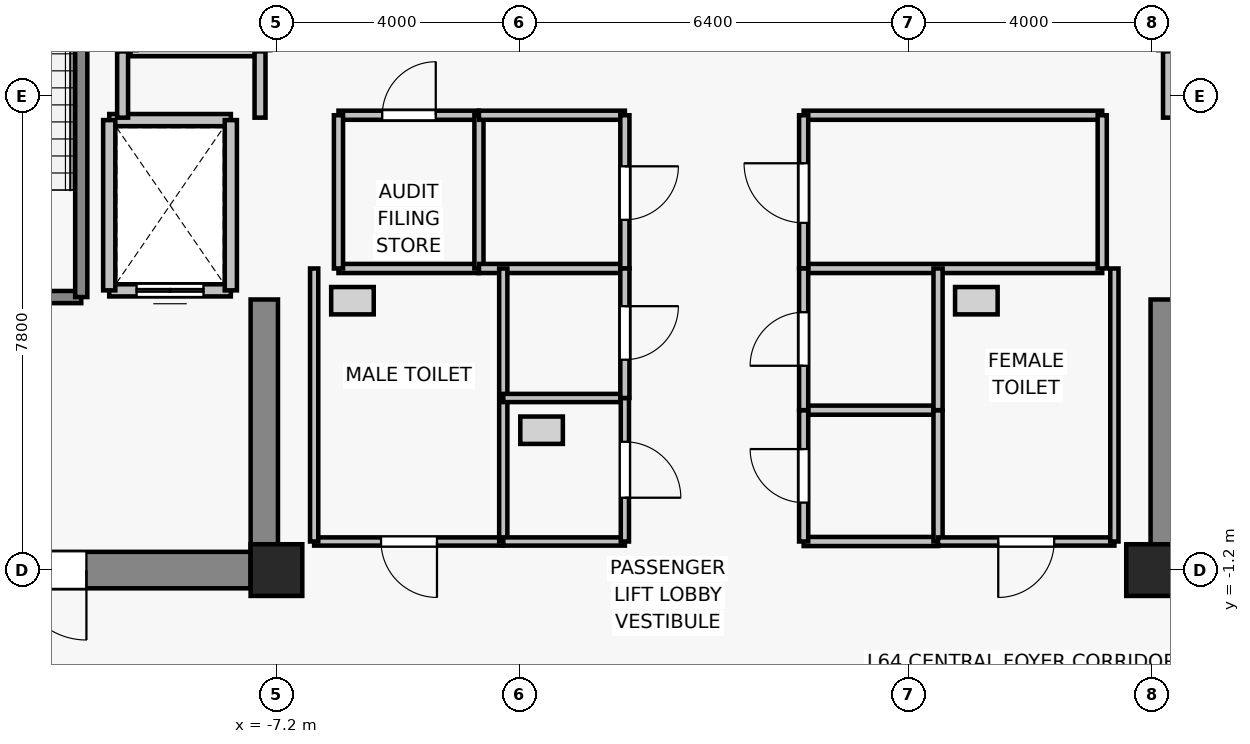
"""IFC4 building model, lengths in metres.
Left out: names, types, materials, properties, quantities, classifications, styles, units other than length and angle.
Written with IfcOpenShell. Run it as: python <this file> out.ifc"""

import sys

from ifc_helpers import new_model, si_unit, direction, frame, frame_2d, origin, origin_2d, place, context, subcontext, project, spatial, rectangle, extrude, source, transform, mapped, element, fill, save


model = new_model("IFC4")
c1 = context("Model", 3, precision=1e-05, world=origin(), true_north=direction((0.0, 1.0)))
c2 = subcontext(c1, "Body", "Model", "MODEL_VIEW")
j1 = project(units=[si_unit("LENGTHUNIT", "METRE"), si_unit("PLANEANGLEUNIT", "RADIAN")], contexts=[c1])
p1 = place(None, origin())
s1 = spatial("IfcSite", under=j1, at=p1, CompositionType="ELEMENT")
p2 = place(p1, origin())
s2 = spatial("IfcBuilding", under=s1, at=p2, CompositionType="ELEMENT")
p3 = place(p2, frame((0.0, 0.0, 228.7)))
s3 = spatial("IfcBuildingStorey", under=s2, at=p3, CompositionType="ELEMENT", Elevation=228.7)
for number, where, z_axis, x_axis in (
    (1, (-7.2, -1.2, 0.0), (0.0, 0.0, 1.0), (1.0, 0.0, 0.0)),
    (2, (7.2, -1.2, 0.0), (0.0, 0.0, 1.0), (1.0, 0.0, 0.0)),
):
    element("IfcColumn", number, at=place(p3, frame(where, z_axis=z_axis, x_axis=x_axis)), inside=s3, PredefinedType="COLUMN", context=c2, shape_type="SweptSolid", body=[
        extrude(rectangle(XDim=0.85, YDim=0.85, at=origin_2d()), origin(), (0.0, 0.0, 1.0), 3.3),
    ])
p4 = place(p3, frame((-7.625, -1.2, 0.0), z_axis=(0.0, 0.0, 1.0), x_axis=(-1.0, 0.0, 0.0)))
e3 = element("IfcWall", 3, at=p4, inside=s3, PredefinedType="SHEAR", context=c2, shape_type="SweptSolid", body=[
    extrude(rectangle(XDim=6.35, YDim=0.6, at=frame_2d((3.175, 0.0))), origin(), (0.0, 0.0, 1.0), 3.075),
])
p5 = place(p4, frame((2.7, 0.0, 0.0)))
e4 = element("IfcOpeningElement", 4, at=p5, cuts=e3, PredefinedType="OPENING", context=c2, shape_type="SweptSolid", body=[
    extrude(rectangle(XDim=1.15, YDim=2.15, at=frame_2d((0.575, 1.075))), frame((0.0, 0.31, 0.0), z_axis=(0.0, -1.0, 0.0), x_axis=(1.0, 0.0, 0.0)), (0.0, 0.0, 1.0), 0.62),
])
for number, where, z_axis, x_axis in (
    (5, (-7.4, -0.9, 0.0), (0.0, 0.0, 1.0), (0.0, 1.0, 0.0)),
    (6, (7.4, -0.9, 0.0), (0.0, 0.0, 1.0), (0.0, 1.0, 0.0)),
):
    element("IfcWall", number, at=place(p3, frame(where, z_axis=z_axis, x_axis=x_axis)), inside=s3, PredefinedType="SHEAR", context=c2, shape_type="SweptSolid", body=[
        extrude(rectangle(XDim=4.15, YDim=0.45, at=frame_2d((2.075, 0.0))), origin(), (0.0, 0.0, 1.0), 3.075),
    ])
p6 = place(p3, frame((-7.95, 3.4, 0.0), z_axis=(0.0, 0.0, 1.0), x_axis=(-1.0, 0.0, 0.0)))
e7 = element("IfcWall", 7, at=p6, inside=s3, PredefinedType="SOLIDWALL", context=c2, shape_type="SweptSolid", body=[
    extrude(rectangle(XDim=2.0, YDim=0.2, at=frame_2d((1.0, 0.0))), origin(), (0.0, 0.0, 1.0), 3.075),
])
p7 = place(p6, frame((0.45, 0.0, 0.0)))
e8 = element("IfcOpeningElement", 8, at=p7, cuts=e7, PredefinedType="OPENING", context=c2, shape_type="SweptSolid", body=[
    extrude(rectangle(XDim=1.1, YDim=2.2, at=frame_2d((0.55, 1.1))), frame((0.0, 0.11, 0.0), z_axis=(0.0, -1.0, 0.0), x_axis=(1.0, 0.0, 0.0)), (0.0, 0.0, 1.0), 0.22),
])
p8 = place(p3, frame((-9.95, 6.2, 0.0), z_axis=(0.0, 0.0, 1.0), x_axis=(1.0, 0.0, 0.0)))
e9 = element("IfcWall", 9, at=p8, inside=s3, PredefinedType="SOLIDWALL", context=c2, shape_type="SweptSolid", body=[
    extrude(rectangle(XDim=2.0, YDim=0.2, at=frame_2d((1.0, 0.0))), origin(), (0.0, 0.0, 1.0), 3.075),
])
for number, where, z_axis, x_axis in (
    (10, (-9.95, 3.4, 0.0), (0.0, 0.0, 1.0), (0.0, 1.0, 0.0)),
    (11, (-7.95, 6.2, 0.0), (0.0, 0.0, 1.0), (0.0, -1.0, 0.0)),
):
    element("IfcWall", number, at=place(p3, frame(where, z_axis=z_axis, x_axis=x_axis)), inside=s3, PredefinedType="SOLIDWALL", context=c2, shape_type="SweptSolid", body=[
        extrude(rectangle(XDim=2.8, YDim=0.2, at=frame_2d((1.4, 0.0))), origin(), (0.0, 0.0, 1.0), 3.075),
    ])
for number, where, z_axis, x_axis in (
    (12, (-7.4, 7.35, 0.0), (0.0, 0.0, 1.0), (-1.0, 0.0, 0.0)),
    (13, (9.6, 7.35, 0.0), (0.0, 0.0, 1.0), (-1.0, 0.0, 0.0)),
):
    element("IfcWall", number, at=place(p3, frame(where, z_axis=z_axis, x_axis=x_axis)), inside=s3, PredefinedType="SOLIDWALL", context=c2, shape_type="SweptSolid", body=[
        extrude(rectangle(XDim=2.2, YDim=0.2, at=frame_2d((1.1, 0.0))), origin(), (0.0, 0.0, 1.0), 2.615),
    ])
p9 = place(p3, frame((-10.41, 3.29, 0.0), z_axis=(0.0, 0.0, 1.0), x_axis=(-1.0, 0.0, 0.0)))
e14 = element("IfcWall", 14, at=p9, inside=s3, PredefinedType="SOLIDWALL", context=c2, shape_type="SweptSolid", body=[
    extrude(rectangle(XDim=3.52, YDim=0.2, at=frame_2d((1.76, 0.0))), origin(), (0.0, 0.0, 1.0), 3.075),
])
p10 = place(p9, frame((1.165, 0.0, 0.0)))
e15 = element("IfcOpeningElement", 15, at=p10, cuts=e14, PredefinedType="OPENING", context=c2, shape_type="SweptSolid", body=[
    extrude(rectangle(XDim=1.15, YDim=2.15, at=frame_2d((0.575, 1.075))), frame((0.0, 0.11, 0.0), z_axis=(0.0, -1.0, 0.0), x_axis=(1.0, 0.0, 0.0)), (0.0, 0.0, 1.0), 0.22),
])
p11 = place(p3, frame((-10.41, 12.13, 0.0), z_axis=(0.0, 0.0, 1.0), x_axis=(0.0, -1.0, 0.0)))
e16 = element("IfcWall", 16, at=p11, inside=s3, PredefinedType="SOLIDWALL", context=c2, shape_type="SweptSolid", body=[
    extrude(rectangle(XDim=8.84, YDim=0.2, at=frame_2d((4.42, 0.0))), origin(), (0.0, 0.0, 1.0), 3.075),
])
p12 = place(p3, frame((-9.73, 6.24, 0.0), z_axis=(0.0, 0.0, 1.0), x_axis=(0.0, 1.0, 0.0)))
e17 = element("IfcWall", 17, at=p12, inside=s3, PredefinedType="PARTITIONING", context=c2, shape_type="SweptSolid", body=[
    extrude(rectangle(XDim=1.09, YDim=0.18, at=frame_2d((0.545, 0.0))), origin(), (0.0, 0.0, 1.0), 3.075),
])
for number, where, z_axis, x_axis in (
    (18, (-7.47, 7.33, 0.0), (0.0, 0.0, 1.0), (0.0, -1.0, 0.0)),
    (19, (7.47, 6.24, 0.0), (0.0, 0.0, 1.0), (0.0, 1.0, 0.0)),
):
    element("IfcWall", number, at=place(p3, frame(where, z_axis=z_axis, x_axis=x_axis)), inside=s3, PredefinedType="PARTITIONING", context=c2, shape_type="SweptSolid", body=[
        extrude(rectangle(XDim=1.09, YDim=0.18, at=frame_2d((0.545, 0.0))), origin(), (0.0, 0.0, 1.0), 2.615),
    ])
p13 = place(p3, frame((-3.87, 3.76, 0.0), z_axis=(0.0, 0.0, 1.0), x_axis=(-1.0, 0.0, 0.0)))
e20 = element("IfcWall", 20, at=p13, inside=s3, PredefinedType="PARTITIONING", context=c2, shape_type="SweptSolid", body=[
    extrude(rectangle(XDim=2.31, YDim=0.15, at=frame_2d((1.155, 0.0))), origin(), (0.0, 0.0, 1.0), 3.075),
])
p14 = place(p3, frame((-6.18, 6.28, 0.0), z_axis=(0.0, 0.0, 1.0), x_axis=(1.0, 0.0, 0.0)))
e21 = element("IfcWall", 21, at=p14, inside=s3, PredefinedType="PARTITIONING", context=c2, shape_type="SweptSolid", body=[
    extrude(rectangle(XDim=2.31, YDim=0.15, at=frame_2d((1.155, 0.0))), origin(), (0.0, 0.0, 1.0), 3.075),
])
p15 = place(p14, frame((0.72, 0.0, 0.0)))
e22 = element("IfcOpeningElement", 22, at=p15, cuts=e21, PredefinedType="OPENING", context=c2, shape_type="SweptSolid", body=[
    extrude(rectangle(XDim=0.88, YDim=2.1, at=frame_2d((0.44, 1.05))), frame((0.0, 0.085, 0.0), z_axis=(0.0, -1.0, 0.0), x_axis=(1.0, 0.0, 0.0)), (0.0, 0.0, 1.0), 0.17),
])
for number, where, z_axis, x_axis in (
    (23, (-6.18, 3.76, 0.0), (0.0, 0.0, 1.0), (0.0, 1.0, 0.0)),
    (24, (-3.87, 6.28, 0.0), (0.0, 0.0, 1.0), (0.0, -1.0, 0.0)),
):
    element("IfcWall", number, at=place(p3, frame(where, z_axis=z_axis, x_axis=x_axis)), inside=s3, PredefinedType="PARTITIONING", context=c2, shape_type="SweptSolid", body=[
        extrude(rectangle(XDim=2.52, YDim=0.15, at=frame_2d((1.26, 0.0))), origin(), (0.0, 0.0, 1.0), 3.075),
    ])
for number, where, z_axis, x_axis in (
    (25, (-1.47, 3.76, 0.0), (0.0, 0.0, 1.0), (-1.0, 0.0, 0.0)),
    (26, (-3.87, 6.28, 0.0), (0.0, 0.0, 1.0), (1.0, 0.0, 0.0)),
):
    element("IfcWall", number, at=place(p3, frame(where, z_axis=z_axis, x_axis=x_axis)), inside=s3, PredefinedType="PARTITIONING", context=c2, shape_type="SweptSolid", body=[
        extrude(rectangle(XDim=2.4, YDim=0.15, at=frame_2d((1.2, 0.0))), origin(), (0.0, 0.0, 1.0), 3.075),
    ])
p16 = place(p3, frame((-1.47, 6.28, 0.0), z_axis=(0.0, 0.0, 1.0), x_axis=(0.0, -1.0, 0.0)))
e27 = element("IfcWall", 27, at=p16, inside=s3, PredefinedType="PARTITIONING", context=c2, shape_type="SweptSolid", body=[
    extrude(rectangle(XDim=2.52, YDim=0.15, at=frame_2d((1.26, 0.0))), origin(), (0.0, 0.0, 1.0), 3.075),
])
p17 = place(p16, frame((0.84, 0.0, 0.0)))
e28 = element("IfcOpeningElement", 28, at=p17, cuts=e27, PredefinedType="OPENING", context=c2, shape_type="SweptSolid", body=[
    extrude(rectangle(XDim=0.88, YDim=2.1, at=frame_2d((0.44, 1.05))), frame((0.0, 0.085, 0.0), z_axis=(0.0, -1.0, 0.0), x_axis=(1.0, 0.0, 0.0)), (0.0, 0.0, 1.0), 0.17),
])
for number, where, z_axis, x_axis in (
    (29, (6.38, 3.76, 0.0), (0.0, 0.0, 1.0), (-1.0, 0.0, 0.0)),
    (30, (1.47, 6.28, 0.0), (0.0, 0.0, 1.0), (1.0, 0.0, 0.0)),
):
    element("IfcWall", number, at=place(p3, frame(where, z_axis=z_axis, x_axis=x_axis)), inside=s3, PredefinedType="PARTITIONING", context=c2, shape_type="SweptSolid", body=[
        extrude(rectangle(XDim=4.91, YDim=0.15, at=frame_2d((2.455, 0.0))), origin(), (0.0, 0.0, 1.0), 3.075),
    ])
p18 = place(p3, frame((1.47, 3.76, 0.0), z_axis=(0.0, 0.0, 1.0), x_axis=(0.0, 1.0, 0.0)))
e31 = element("IfcWall", 31, at=p18, inside=s3, PredefinedType="PARTITIONING", context=c2, shape_type="SweptSolid", body=[
    extrude(rectangle(XDim=2.52, YDim=0.15, at=frame_2d((1.26, 0.0))), origin(), (0.0, 0.0, 1.0), 3.075),
])
p19 = place(p18, frame((0.75, 0.0, 0.0)))
e32 = element("IfcOpeningElement", 32, at=p19, cuts=e31, PredefinedType="OPENING", context=c2, shape_type="SweptSolid", body=[
    extrude(rectangle(XDim=0.98, YDim=2.15, at=frame_2d((0.49, 1.075))), frame((0.0, 0.085, 0.0), z_axis=(0.0, -1.0, 0.0), x_axis=(1.0, 0.0, 0.0)), (0.0, 0.0, 1.0), 0.17),
])
p20 = place(p3, frame((6.38, 6.28, 0.0), z_axis=(0.0, 0.0, 1.0), x_axis=(0.0, -1.0, 0.0)))
e33 = element("IfcWall", 33, at=p20, inside=s3, PredefinedType="PARTITIONING", context=c2, shape_type="SweptSolid", body=[
    extrude(rectangle(XDim=2.52, YDim=0.15, at=frame_2d((1.26, 0.0))), origin(), (0.0, 0.0, 1.0), 3.075),
])
p21 = place(p3, frame((-3.47, -0.73, 0.0), z_axis=(0.0, 0.0, 1.0), x_axis=(-1.0, 0.0, 0.0)))
e34 = element("IfcWall", 34, at=p21, inside=s3, PredefinedType="PARTITIONING", context=c2, shape_type="SweptSolid", body=[
    extrude(rectangle(XDim=3.11, YDim=0.135, at=frame_2d((1.555, 0.0))), origin(), (0.0, 0.0, 1.0), 3.075),
])
p22 = place(p21, frame((1.09, 0.0, 0.0)))
e35 = element("IfcOpeningElement", 35, at=p22, cuts=e34, PredefinedType="OPENING", context=c2, shape_type="SweptSolid", body=[
    extrude(rectangle(XDim=0.92, YDim=2.1, at=frame_2d((0.46, 1.05))), frame((0.0, 0.077, 0.0), z_axis=(0.0, -1.0, 0.0), x_axis=(1.0, 0.0, 0.0)), (0.0, 0.0, 1.0), 0.155),
])
for number, where, z_axis, x_axis in (
    (36, (-6.58, -0.73, 0.0), (0.0, 0.0, 1.0), (0.0, 1.0, 0.0)),
    (37, (-3.47, 3.76, 0.0), (0.0, 0.0, 1.0), (0.0, -1.0, 0.0)),
):
    element("IfcWall", number, at=place(p3, frame(where, z_axis=z_axis, x_axis=x_axis)), inside=s3, PredefinedType="PARTITIONING", context=c2, shape_type="SweptSolid", body=[
        extrude(rectangle(XDim=4.49, YDim=0.135, at=frame_2d((2.245, 0.0))), origin(), (0.0, 0.0, 1.0), 3.075),
    ])
for number, where, z_axis, x_axis in (
    (38, (-1.47, -0.73, 0.0), (0.0, 0.0, 1.0), (-1.0, 0.0, 0.0)),
    (39, (-3.47, 1.63, 0.0), (0.0, 0.0, 1.0), (1.0, 0.0, 0.0)),
):
    element("IfcWall", number, at=place(p3, frame(where, z_axis=z_axis, x_axis=x_axis)), inside=s3, PredefinedType="PARTITIONING", context=c2, shape_type="SweptSolid", body=[
        extrude(rectangle(XDim=2.0, YDim=0.135, at=frame_2d((1.0, 0.0))), origin(), (0.0, 0.0, 1.0), 3.075),
    ])
p23 = place(p3, frame((-1.47, 1.63, 0.0), z_axis=(0.0, 0.0, 1.0), x_axis=(0.0, -1.0, 0.0)))
e40 = element("IfcWall", 40, at=p23, inside=s3, PredefinedType="PARTITIONING", context=c2, shape_type="SweptSolid", body=[
    extrude(rectangle(XDim=2.36, YDim=0.135, at=frame_2d((1.18, 0.0))), origin(), (0.0, 0.0, 1.0), 3.075),
])
p24 = place(p23, frame((0.72, 0.0, 0.0)))
e41 = element("IfcOpeningElement", 41, at=p24, cuts=e40, PredefinedType="OPENING", context=c2, shape_type="SweptSolid", body=[
    extrude(rectangle(XDim=0.92, YDim=2.1, at=frame_2d((0.46, 1.05))), frame((0.0, 0.077, 0.0), z_axis=(0.0, -1.0, 0.0), x_axis=(1.0, 0.0, 0.0)), (0.0, 0.0, 1.0), 0.155),
])
p25 = place(p3, frame((-1.47, 3.76, 0.0), z_axis=(0.0, 0.0, 1.0), x_axis=(0.0, -1.0, 0.0)))
e42 = element("IfcWall", 42, at=p25, inside=s3, PredefinedType="PARTITIONING", context=c2, shape_type="SweptSolid", body=[
    extrude(rectangle(XDim=2.13, YDim=0.15, at=frame_2d((1.065, 0.0))), origin(), (0.0, 0.0, 1.0), 3.075),
])
p26 = place(p25, frame((0.62, 0.0, 0.0)))
e43 = element("IfcOpeningElement", 43, at=p26, cuts=e42, PredefinedType="OPENING", context=c2, shape_type="SweptSolid", body=[
    extrude(rectangle(XDim=0.88, YDim=2.1, at=frame_2d((0.44, 1.05))), frame((0.0, 0.085, 0.0), z_axis=(0.0, -1.0, 0.0), x_axis=(1.0, 0.0, 0.0)), (0.0, 0.0, 1.0), 0.17),
])
for number, where, z_axis, x_axis in (
    (44, (3.68, -0.73, 0.0), (0.0, 0.0, 1.0), (-1.0, 0.0, 0.0)),
    (45, (1.47, 1.43, 0.0), (0.0, 0.0, 1.0), (1.0, 0.0, 0.0)),
):
    element("IfcWall", number, at=place(p3, frame(where, z_axis=z_axis, x_axis=x_axis)), inside=s3, PredefinedType="PARTITIONING", context=c2, shape_type="SweptSolid", body=[
        extrude(rectangle(XDim=2.21, YDim=0.15, at=frame_2d((1.105, 0.0))), origin(), (0.0, 0.0, 1.0), 3.075),
    ])
p27 = place(p3, frame((1.47, -0.73, 0.0), z_axis=(0.0, 0.0, 1.0), x_axis=(0.0, 1.0, 0.0)))
e46 = element("IfcWall", 46, at=p27, inside=s3, PredefinedType="PARTITIONING", context=c2, shape_type="SweptSolid", body=[
    extrude(rectangle(XDim=2.16, YDim=0.15, at=frame_2d((1.08, 0.0))), origin(), (0.0, 0.0, 1.0), 3.075),
])
p28 = place(p27, frame((0.64, 0.0, 0.0)))
e47 = element("IfcOpeningElement", 47, at=p28, cuts=e46, PredefinedType="OPENING", context=c2, shape_type="SweptSolid", body=[
    extrude(rectangle(XDim=0.88, YDim=2.1, at=frame_2d((0.44, 1.05))), frame((0.0, 0.085, 0.0), z_axis=(0.0, -1.0, 0.0), x_axis=(1.0, 0.0, 0.0)), (0.0, 0.0, 1.0), 0.17),
])
p29 = place(p3, frame((3.68, 1.43, 0.0), z_axis=(0.0, 0.0, 1.0), x_axis=(0.0, -1.0, 0.0)))
e48 = element("IfcWall", 48, at=p29, inside=s3, PredefinedType="PARTITIONING", context=c2, shape_type="SweptSolid", body=[
    extrude(rectangle(XDim=2.16, YDim=0.15, at=frame_2d((1.08, 0.0))), origin(), (0.0, 0.0, 1.0), 3.075),
])
p30 = place(p3, frame((1.47, 1.43, 0.0), z_axis=(0.0, 0.0, 1.0), x_axis=(0.0, 1.0, 0.0)))
e49 = element("IfcWall", 49, at=p30, inside=s3, PredefinedType="PARTITIONING", context=c2, shape_type="SweptSolid", body=[
    extrude(rectangle(XDim=2.33, YDim=0.15, at=frame_2d((1.165, 0.0))), origin(), (0.0, 0.0, 1.0), 3.075),
])
p31 = place(p30, frame((0.73, 0.0, 0.0)))
e50 = element("IfcOpeningElement", 50, at=p31, cuts=e49, PredefinedType="OPENING", context=c2, shape_type="SweptSolid", body=[
    extrude(rectangle(XDim=0.88, YDim=2.15, at=frame_2d((0.44, 1.075))), frame((0.0, 0.085, 0.0), z_axis=(0.0, -1.0, 0.0), x_axis=(1.0, 0.0, 0.0)), (0.0, 0.0, 1.0), 0.17),
])
p32 = place(p3, frame((3.68, 3.76, 0.0), z_axis=(0.0, 0.0, 1.0), x_axis=(0.0, -1.0, 0.0)))
e51 = element("IfcWall", 51, at=p32, inside=s3, PredefinedType="PARTITIONING", context=c2, shape_type="SweptSolid", body=[
    extrude(rectangle(XDim=2.33, YDim=0.15, at=frame_2d((1.165, 0.0))), origin(), (0.0, 0.0, 1.0), 3.075),
])
p33 = place(p3, frame((6.58, -0.73, 0.0), z_axis=(0.0, 0.0, 1.0), x_axis=(-1.0, 0.0, 0.0)))
e52 = element("IfcWall", 52, at=p33, inside=s3, PredefinedType="PARTITIONING", context=c2, shape_type="SweptSolid", body=[
    extrude(rectangle(XDim=2.9, YDim=0.135, at=frame_2d((1.45, 0.0))), origin(), (0.0, 0.0, 1.0), 3.075),
])
p34 = place(p33, frame((0.99, 0.0, 0.0)))
e53 = element("IfcOpeningElement", 53, at=p34, cuts=e52, PredefinedType="OPENING", context=c2, shape_type="SweptSolid", body=[
    extrude(rectangle(XDim=0.92, YDim=2.1, at=frame_2d((0.46, 1.05))), frame((0.0, 0.077, 0.0), z_axis=(0.0, -1.0, 0.0), x_axis=(1.0, 0.0, 0.0)), (0.0, 0.0, 1.0), 0.155),
])
p35 = place(p3, frame((6.58, 3.76, 0.0), z_axis=(0.0, 0.0, 1.0), x_axis=(0.0, -1.0, 0.0)))
e54 = element("IfcWall", 54, at=p35, inside=s3, PredefinedType="PARTITIONING", context=c2, shape_type="SweptSolid", body=[
    extrude(rectangle(XDim=4.49, YDim=0.135, at=frame_2d((2.245, 0.0))), origin(), (0.0, 0.0, 1.0), 3.075),
])
m1 = source(origin(), c2, "Body", "SweptSolid", [
    extrude(rectangle(XDim=1.1, YDim=2.2, at=frame_2d((0.55, 1.1))), frame((0.0, 0.025, 0.0), z_axis=(0.0, -1.0, 0.0), x_axis=(1.0, 0.0, 0.0)), (0.0, 0.0, 1.0), 0.05),
])
p36 = place(p7, origin())
e55 = element("IfcDoor", 55, at=p36, inside=s3, OperationType="DOUBLE_DOOR_SLIDING", PredefinedType="DOOR", context=c2, shape_type="MappedRepresentation", body=[
    mapped(m1, transform((0.0, 0.0, 0.0), x_axis=(1.0, 0.0, 0.0), y_axis=(0.0, 1.0, 0.0), z_axis=(0.0, 0.0, 1.0), scale=1.0)),
])
fill(e8, e55)
m2 = source(origin(), c2, "Body", "SweptSolid", [
    extrude(rectangle(XDim=1.15, YDim=2.15, at=frame_2d((0.575, 1.075))), frame((0.0, 0.025, 0.0), z_axis=(0.0, -1.0, 0.0), x_axis=(1.0, 0.0, 0.0)), (0.0, 0.0, 1.0), 0.05),
])
p37 = place(p5, origin())
e56 = element("IfcDoor", 56, at=p37, inside=s3, OperationType="SINGLE_SWING_LEFT", PredefinedType="DOOR", context=c2, shape_type="MappedRepresentation", body=[
    mapped(m2, transform((0.0, 0.0, 0.0), x_axis=(1.0, 0.0, 0.0), y_axis=(0.0, 1.0, 0.0), z_axis=(0.0, 0.0, 1.0), scale=1.0)),
])
fill(e4, e56)
m3 = source(origin(), c2, "Body", "SweptSolid", [
    extrude(rectangle(XDim=0.88, YDim=2.1, at=frame_2d((0.44, 1.05))), frame((0.0, 0.025, 0.0), z_axis=(0.0, -1.0, 0.0), x_axis=(1.0, 0.0, 0.0)), (0.0, 0.0, 1.0), 0.05),
])
p38 = place(p15, origin())
e57 = element("IfcDoor", 57, at=p38, inside=s3, OperationType="SINGLE_SWING_RIGHT", PredefinedType="DOOR", context=c2, shape_type="MappedRepresentation", body=[
    mapped(m3, transform((0.0, 0.0, 0.0), x_axis=(1.0, 0.0, 0.0), y_axis=(0.0, 1.0, 0.0), z_axis=(0.0, 0.0, 1.0), scale=1.0)),
])
fill(e22, e57)
p39 = place(p17, origin())
e58 = element("IfcDoor", 58, at=p39, inside=s3, OperationType="SINGLE_SWING_LEFT", PredefinedType="DOOR", context=c2, shape_type="MappedRepresentation", body=[
    mapped(m3, transform((0.0, 0.0, 0.0), x_axis=(1.0, 0.0, 0.0), y_axis=(0.0, 1.0, 0.0), z_axis=(0.0, 0.0, 1.0), scale=1.0)),
])
fill(e28, e58)
m4 = source(origin(), c2, "Body", "SweptSolid", [
    extrude(rectangle(XDim=0.98, YDim=2.15, at=frame_2d((0.49, 1.075))), frame((0.0, 0.025, 0.0), z_axis=(0.0, -1.0, 0.0), x_axis=(1.0, 0.0, 0.0)), (0.0, 0.0, 1.0), 0.05),
])
p40 = place(p19, origin())
e59 = element("IfcDoor", 59, at=p40, inside=s3, OperationType="SINGLE_SWING_RIGHT", PredefinedType="DOOR", context=c2, shape_type="MappedRepresentation", body=[
    mapped(m4, transform((0.0, 0.0, 0.0), x_axis=(1.0, 0.0, 0.0), y_axis=(0.0, 1.0, 0.0), z_axis=(0.0, 0.0, 1.0), scale=1.0)),
])
fill(e32, e59)
m5 = source(origin(), c2, "Body", "SweptSolid", [
    extrude(rectangle(XDim=0.92, YDim=2.1, at=frame_2d((0.46, 1.05))), frame((0.0, 0.025, 0.0), z_axis=(0.0, -1.0, 0.0), x_axis=(1.0, 0.0, 0.0)), (0.0, 0.0, 1.0), 0.05),
])
p41 = place(p22, origin())
e60 = element("IfcDoor", 60, at=p41, inside=s3, OperationType="SINGLE_SWING_LEFT", PredefinedType="DOOR", context=c2, shape_type="MappedRepresentation", body=[
    mapped(m5, transform((0.0, 0.0, 0.0), x_axis=(1.0, 0.0, 0.0), y_axis=(0.0, 1.0, 0.0), z_axis=(0.0, 0.0, 1.0), scale=1.0)),
])
fill(e35, e60)
p42 = place(p24, origin())
e61 = element("IfcDoor", 61, at=p42, inside=s3, OperationType="SINGLE_SWING_RIGHT", PredefinedType="DOOR", context=c2, shape_type="MappedRepresentation", body=[
    mapped(m5, transform((0.0, 0.0, 0.0), x_axis=(1.0, 0.0, 0.0), y_axis=(0.0, 1.0, 0.0), z_axis=(0.0, 0.0, 1.0), scale=1.0)),
])
fill(e41, e61)
p43 = place(p26, origin())
e62 = element("IfcDoor", 62, at=p43, inside=s3, OperationType="SINGLE_SWING_LEFT", PredefinedType="DOOR", context=c2, shape_type="MappedRepresentation", body=[
    mapped(m3, transform((0.0, 0.0, 0.0), x_axis=(1.0, 0.0, 0.0), y_axis=(0.0, 1.0, 0.0), z_axis=(0.0, 0.0, 1.0), scale=1.0)),
])
fill(e43, e62)
p44 = place(p28, origin())
e63 = element("IfcDoor", 63, at=p44, inside=s3, OperationType="SINGLE_SWING_RIGHT", PredefinedType="DOOR", context=c2, shape_type="MappedRepresentation", body=[
    mapped(m3, transform((0.0, 0.0, 0.0), x_axis=(1.0, 0.0, 0.0), y_axis=(0.0, 1.0, 0.0), z_axis=(0.0, 0.0, 1.0), scale=1.0)),
])
fill(e47, e63)
m6 = source(origin(), c2, "Body", "SweptSolid", [
    extrude(rectangle(XDim=0.88, YDim=2.15, at=frame_2d((0.44, 1.075))), frame((0.0, 0.025, 0.0), z_axis=(0.0, -1.0, 0.0), x_axis=(1.0, 0.0, 0.0)), (0.0, 0.0, 1.0), 0.05),
])
p45 = place(p31, origin())
e64 = element("IfcDoor", 64, at=p45, inside=s3, OperationType="SINGLE_SWING_LEFT", PredefinedType="DOOR", context=c2, shape_type="MappedRepresentation", body=[
    mapped(m6, transform((0.0, 0.0, 0.0), x_axis=(1.0, 0.0, 0.0), y_axis=(0.0, 1.0, 0.0), z_axis=(0.0, 0.0, 1.0), scale=1.0)),
])
fill(e50, e64)
p46 = place(p34, origin())
e65 = element("IfcDoor", 65, at=p46, inside=s3, OperationType="SINGLE_SWING_RIGHT", PredefinedType="DOOR", context=c2, shape_type="MappedRepresentation", body=[
    mapped(m5, transform((0.0, 0.0, 0.0), x_axis=(1.0, 0.0, 0.0), y_axis=(0.0, 1.0, 0.0), z_axis=(0.0, 0.0, 1.0), scale=1.0)),
])
fill(e53, e65)
save(model, sys.argv[1])
